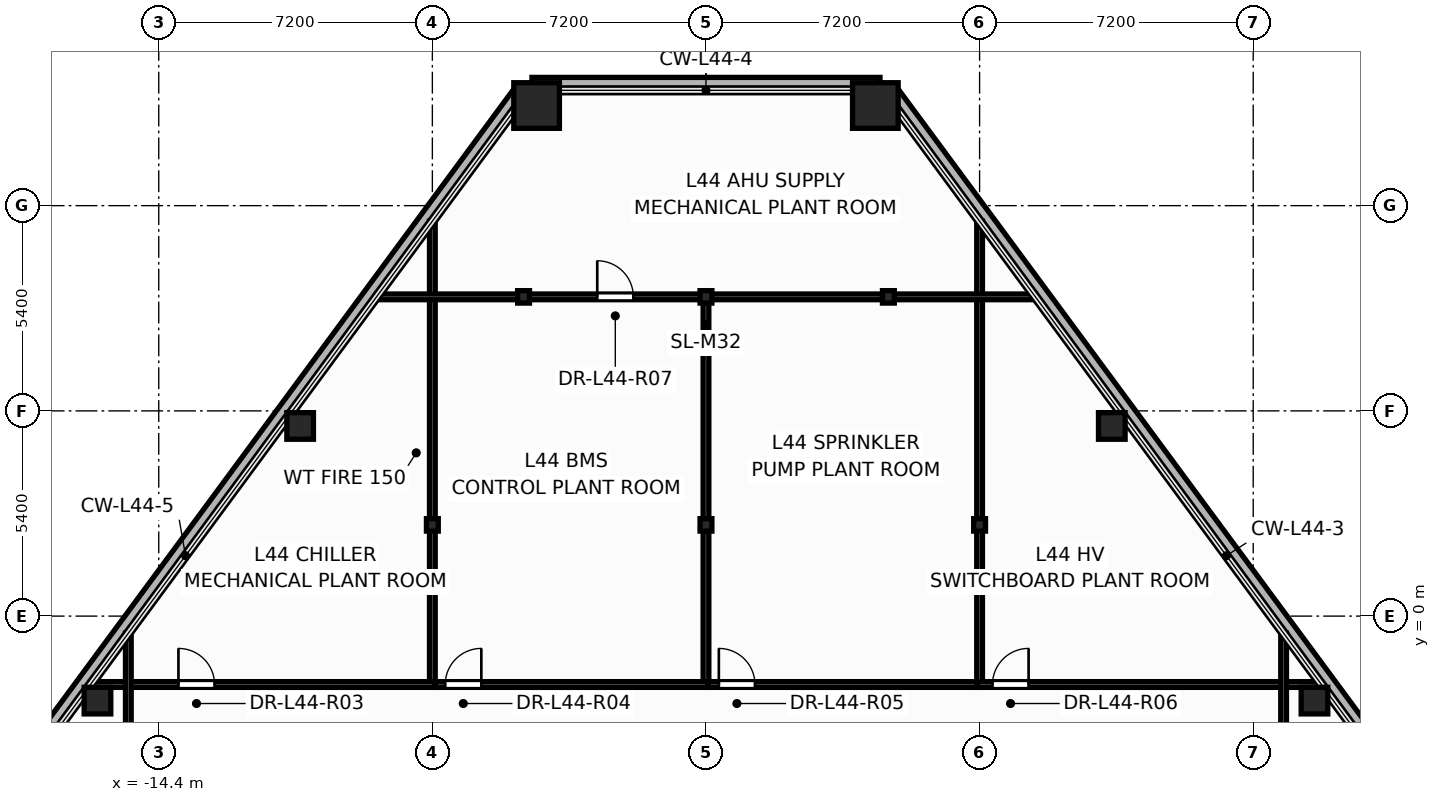
"""IFC4 building model, lengths in metres.
Left out: names, types, materials, properties, quantities, classifications, styles, units other than length and angle.
Written with IfcOpenShell. Run it as: python <this file> out.ifc"""

import sys

from ifc_helpers import new_model, si_unit, direction, frame, frame_2d, origin, origin_2d, place, context, subcontext, project, spatial, rectangle, hollow_rectangle, hollow_circle, i_section, extrude, element, fill, save


model = new_model("IFC4")
c1 = context("Model", 3, precision=1e-05, world=origin(), true_north=direction((0.0, 1.0)))
c2 = subcontext(c1, "Body", "Model", "MODEL_VIEW")
j1 = project(units=[si_unit("LENGTHUNIT", "METRE"), si_unit("PLANEANGLEUNIT", "RADIAN")], contexts=[c1])
p1 = place(None, origin())
s1 = spatial("IfcSite", under=j1, at=p1, CompositionType="ELEMENT")
p2 = place(p1, origin())
s2 = spatial("IfcBuilding", under=s1, at=p2, CompositionType="ELEMENT")
p3 = place(p2, frame((0.0, 0.0, 168.9)))
s3 = spatial("IfcBuildingStorey", under=s2, at=p3, CompositionType="ELEMENT", Elevation=168.9)
for number, where, z_axis, x_axis in (
    (1, (4.457, 13.435, 0.0), (0.0, 0.0, 1.0), (1.0, 0.0, 0.0)),
    (2, (-4.457, 13.435, 0.0), (0.0, 0.0, 1.0), (1.0, 0.0, 0.0)),
):
    element("IfcColumn", number, at=place(p3, frame(where, z_axis=z_axis, x_axis=x_axis)), inside=s3, PredefinedType="COLUMN", context=c2, shape_type="SweptSolid", body=[
        extrude(hollow_rectangle(XDim=1.2, YDim=1.2, WallThickness=0.055, at=origin_2d()), origin(), (0.0, 0.0, 1.0), 4.8),
    ])
for number, where, z_axis, x_axis in (
    (3, (16.012, -2.223, 0.0), (0.0, 0.0, 1.0), (1.0, 0.0, 0.0)),
    (4, (10.679, 5.003, 0.0), (0.0, 0.0, 1.0), (1.0, 0.0, 0.0)),
    (5, (-10.679, 5.003, 0.0), (0.0, 0.0, 1.0), (1.0, 0.0, 0.0)),
    (6, (-16.012, -2.223, 0.0), (0.0, 0.0, 1.0), (1.0, 0.0, 0.0)),
):
    element("IfcColumn", number, at=place(p3, frame(where, z_axis=z_axis, x_axis=x_axis)), inside=s3, PredefinedType="COLUMN", context=c2, shape_type="SweptSolid", body=[
        extrude(hollow_circle(Radius=0.35, WallThickness=0.03, at=origin_2d()), origin(), (0.0, 0.0, 1.0), 4.8),
    ])
for number, where, z_axis, x_axis in (
    (7, (-7.2, 2.4, 0.0), (0.0, 0.0, 1.0), (1.0, 0.0, 0.0)),
    (8, (0.0, 2.4, 0.0), (0.0, 0.0, 1.0), (1.0, 0.0, 0.0)),
    (9, (7.2, 2.4, 0.0), (0.0, 0.0, 1.0), (1.0, 0.0, 0.0)),
    (10, (-4.8, 8.4, 0.0), (0.0, 0.0, 1.0), (1.0, 0.0, 0.0)),
    (11, (0.0, 8.4, 0.0), (0.0, 0.0, 1.0), (1.0, 0.0, 0.0)),
    (12, (4.8, 8.4, 0.0), (0.0, 0.0, 1.0), (1.0, 0.0, 0.0)),
):
    element("IfcColumn", number, at=place(p3, frame(where, z_axis=z_axis, x_axis=x_axis)), inside=s3, PredefinedType="COLUMN", context=c2, shape_type="SweptSolid", body=[
        extrude(i_section(OverallWidth=0.311, OverallDepth=0.327, WebThickness=0.016, FlangeThickness=0.025, at=origin_2d()), origin(), (0.0, 0.0, 1.0), 4.8),
    ])
p4 = place(p3, frame((22.812, -10.495, -0.2), z_axis=(0.0, 0.0, 1.0), x_axis=(-0.593788907914, 0.804620862791, 0.0)))
e13 = element("IfcWall", 13, at=p4, inside=s3, PredefinedType="PARAPET", context=c2, shape_type="SweptSolid", body=[
    extrude(rectangle(XDim=30.276, YDim=0.36, at=frame_2d((15.138, 0.0))), origin(), (0.0, 0.0, 1.0), 0.38),
])
p5 = place(p3, frame((4.579, 13.995, -0.2), z_axis=(0.0, 0.0, 1.0), x_axis=(-1.0, 0.0, 0.0)))
e14 = element("IfcWall", 14, at=p5, inside=s3, PredefinedType="PARAPET", context=c2, shape_type="SweptSolid", body=[
    extrude(rectangle(XDim=9.158, YDim=0.36, at=frame_2d((4.579, 0.0))), origin(), (0.0, 0.0, 1.0), 0.38),
])
p6 = place(p3, frame((-4.835, 13.865, -0.2), z_axis=(0.0, 0.0, 1.0), x_axis=(-0.593788907914, -0.804620862791, 0.0)))
e15 = element("IfcWall", 15, at=p6, inside=s3, PredefinedType="PARAPET", context=c2, shape_type="SweptSolid", body=[
    extrude(rectangle(XDim=30.276, YDim=0.36, at=frame_2d((15.138, 0.0))), origin(), (0.0, 0.0, 1.0), 0.38),
])
for number, where, z_axis, x_axis in (
    (16, (-7.2, -1.8, 0.0), (0.0, 0.0, 1.0), (0.0, 1.0, 0.0)),
    (17, (7.2, -1.8, 0.0), (0.0, 0.0, 1.0), (0.0, 1.0, 0.0)),
):
    element("IfcWall", number, at=place(p3, frame(where, z_axis=z_axis, x_axis=x_axis)), inside=s3, PredefinedType="PARTITIONING", context=c2, shape_type="SweptSolid", body=[
        extrude(rectangle(XDim=12.191, YDim=0.15, at=frame_2d((6.096, 0.0))), origin(), (0.0, 0.0, 1.0), 2.485),
    ])
p7 = place(p3, frame((0.0, -1.8, 0.0), z_axis=(0.0, 0.0, 1.0), x_axis=(0.0, 1.0, 0.0)))
e18 = element("IfcWall", 18, at=p7, inside=s3, PredefinedType="PARTITIONING", context=c2, shape_type="SweptSolid", body=[
    extrude(rectangle(XDim=10.2, YDim=0.15, at=frame_2d((5.1, 0.0))), origin(), (0.0, 0.0, 1.0), 3.495),
])
p8 = place(p3, frame((-16.197, -1.8, 0.0), z_axis=(0.0, 0.0, 1.0), x_axis=(1.0, 0.0, 0.0)))
e19 = element("IfcWall", 19, at=p8, inside=s3, PredefinedType="PARTITIONING", context=c2, shape_type="SweptSolid", body=[
    extrude(rectangle(XDim=9.057, YDim=0.15, at=frame_2d((4.529, 0.0))), origin(), (0.0, 0.0, 1.0), 2.485),
])
p9 = place(p8, frame((2.315, 0.0, 0.0)))
e20 = element("IfcOpeningElement", 20, at=p9, cuts=e19, PredefinedType="OPENING", context=c2, shape_type="SweptSolid", body=[
    extrude(rectangle(XDim=0.956, YDim=2.104, at=frame_2d((0.475, 1.052))), frame((0.0, 0.085, 0.0), z_axis=(0.0, -1.0, 0.0), x_axis=(1.0, 0.0, 0.0)), (0.0, 0.0, 1.0), 0.17),
])
p10 = place(p3, frame((7.14, -1.8, 0.0), z_axis=(0.0, 0.0, 1.0), x_axis=(1.0, 0.0, 0.0)))
e21 = element("IfcWall", 21, at=p10, inside=s3, PredefinedType="PARTITIONING", context=c2, shape_type="SweptSolid", body=[
    extrude(rectangle(XDim=9.057, YDim=0.15, at=frame_2d((4.529, 0.0))), origin(), (0.0, 0.0, 1.0), 2.485),
])
p11 = place(p10, frame((0.4, 0.0, 0.0)))
e22 = element("IfcOpeningElement", 22, at=p11, cuts=e21, PredefinedType="OPENING", context=c2, shape_type="SweptSolid", body=[
    extrude(rectangle(XDim=0.956, YDim=2.104, at=frame_2d((0.475, 1.052))), frame((0.0, 0.085, 0.0), z_axis=(0.0, -1.0, 0.0), x_axis=(1.0, 0.0, 0.0)), (0.0, 0.0, 1.0), 0.17),
])
p12 = place(p3, frame((-8.67, 8.4, 0.0), z_axis=(0.0, 0.0, 1.0), x_axis=(1.0, 0.0, 0.0)))
e23 = element("IfcWall", 23, at=p12, inside=s3, PredefinedType="PARTITIONING", context=c2, shape_type="SweptSolid", body=[
    extrude(rectangle(XDim=8.67, YDim=0.15, at=frame_2d((4.335, 0.0))), origin(), (0.0, 0.0, 1.0), 2.585),
])
p13 = place(p12, frame((5.809, 0.0, 0.0)))
e24 = element("IfcOpeningElement", 24, at=p13, cuts=e23, PredefinedType="OPENING", context=c2, shape_type="SweptSolid", body=[
    extrude(rectangle(XDim=0.956, YDim=2.104, at=frame_2d((0.475, 1.052))), frame((0.0, 0.085, 0.0), z_axis=(0.0, -1.0, 0.0), x_axis=(1.0, 0.0, 0.0)), (0.0, 0.0, 1.0), 0.17),
])
p14 = place(p3, frame((0.0, 8.4, 0.0), z_axis=(0.0, 0.0, 1.0), x_axis=(1.0, 0.0, 0.0)))
e25 = element("IfcWall", 25, at=p14, inside=s3, PredefinedType="PARTITIONING", context=c2, shape_type="SweptSolid", body=[
    extrude(rectangle(XDim=8.67, YDim=0.15, at=frame_2d((4.335, 0.0))), origin(), (0.0, 0.0, 1.0), 2.585),
])
p15 = place(p3, frame((-7.138, -1.8, 0.0), z_axis=(0.0, 0.0, 1.0), x_axis=(1.0, 0.0, 0.0)))
e26 = element("IfcWall", 26, at=p15, inside=s3, PredefinedType="PARTITIONING", context=c2, shape_type="SweptSolid", body=[
    extrude(rectangle(XDim=7.198, YDim=0.15, at=frame_2d((3.599, 0.0))), origin(), (0.0, 0.0, 1.0), 2.485),
])
p16 = place(p15, frame((0.277, 0.0, 0.0)))
e27 = element("IfcOpeningElement", 27, at=p16, cuts=e26, PredefinedType="OPENING", context=c2, shape_type="SweptSolid", body=[
    extrude(rectangle(XDim=0.956, YDim=2.104, at=frame_2d((0.475, 1.052))), frame((0.0, 0.085, 0.0), z_axis=(0.0, -1.0, 0.0), x_axis=(1.0, 0.0, 0.0)), (0.0, 0.0, 1.0), 0.17),
])
p17 = place(p3, frame((0.062, -1.8, 0.0), z_axis=(0.0, 0.0, 1.0), x_axis=(1.0, 0.0, 0.0)))
e28 = element("IfcWall", 28, at=p17, inside=s3, PredefinedType="PARTITIONING", context=c2, shape_type="SweptSolid", body=[
    extrude(rectangle(XDim=7.076, YDim=0.15, at=frame_2d((3.538, 0.0))), origin(), (0.0, 0.0, 1.0), 2.485),
])
p18 = place(p17, frame((0.277, 0.0, 0.0)))
e29 = element("IfcOpeningElement", 29, at=p18, cuts=e28, PredefinedType="OPENING", context=c2, shape_type="SweptSolid", body=[
    extrude(rectangle(XDim=0.956, YDim=2.104, at=frame_2d((0.475, 1.052))), frame((0.0, 0.085, 0.0), z_axis=(0.0, -1.0, 0.0), x_axis=(1.0, 0.0, 0.0)), (0.0, 0.0, 1.0), 0.17),
])
for number, where, z_axis, x_axis in (
    (30, (-15.2, -4.4, 0.0), (0.0, 0.0, 1.0), (0.0, 1.0, 0.0)),
    (31, (15.2, -4.4, 0.0), (0.0, 0.0, 1.0), (0.0, 1.0, 0.0)),
):
    element("IfcWall", number, at=place(p3, frame(where, z_axis=z_axis, x_axis=x_axis)), inside=s3, PredefinedType="PARTITIONING", context=c2, shape_type="SweptSolid", body=[
        extrude(rectangle(XDim=3.951, YDim=0.15, at=frame_2d((1.975, 0.0))), origin(), (0.0, 0.0, 1.0), 2.485),
    ])
p19 = place(p9, origin())
e32 = element("IfcDoor", 32, at=p19, inside=s3, OperationType="SINGLE_SWING_LEFT", PredefinedType="DOOR", context=c2, shape_type="SweptSolid", body=[
    extrude(rectangle(XDim=0.95, YDim=2.1, at=frame_2d((0.475, 1.05))), frame((0.0, 0.025, 0.0), z_axis=(0.0, -1.0, 0.0), x_axis=(1.0, 0.0, 0.0)), (0.0, 0.0, 1.0), 0.05),
])
fill(e20, e32)
p20 = place(p16, origin())
e33 = element("IfcDoor", 33, at=p20, inside=s3, OperationType="SINGLE_SWING_RIGHT", PredefinedType="DOOR", context=c2, shape_type="SweptSolid", body=[
    extrude(rectangle(XDim=0.95, YDim=2.1, at=frame_2d((0.475, 1.05))), frame((0.0, 0.025, 0.0), z_axis=(0.0, -1.0, 0.0), x_axis=(1.0, 0.0, 0.0)), (0.0, 0.0, 1.0), 0.05),
])
fill(e27, e33)
p21 = place(p18, origin())
e34 = element("IfcDoor", 34, at=p21, inside=s3, OperationType="SINGLE_SWING_LEFT", PredefinedType="DOOR", context=c2, shape_type="SweptSolid", body=[
    extrude(rectangle(XDim=0.95, YDim=2.1, at=frame_2d((0.475, 1.05))), frame((0.0, 0.025, 0.0), z_axis=(0.0, -1.0, 0.0), x_axis=(1.0, 0.0, 0.0)), (0.0, 0.0, 1.0), 0.05),
])
fill(e29, e34)
p22 = place(p11, origin())
e35 = element("IfcDoor", 35, at=p22, inside=s3, OperationType="SINGLE_SWING_RIGHT", PredefinedType="DOOR", context=c2, shape_type="SweptSolid", body=[
    extrude(rectangle(XDim=0.95, YDim=2.1, at=frame_2d((0.475, 1.05))), frame((0.0, 0.025, 0.0), z_axis=(0.0, -1.0, 0.0), x_axis=(1.0, 0.0, 0.0)), (0.0, 0.0, 1.0), 0.05),
])
fill(e22, e35)
p23 = place(p13, origin())
e36 = element("IfcDoor", 36, at=p23, inside=s3, OperationType="SINGLE_SWING_LEFT", PredefinedType="DOOR", context=c2, shape_type="SweptSolid", body=[
    extrude(rectangle(XDim=0.95, YDim=2.1, at=frame_2d((0.475, 1.05))), frame((0.0, 0.025, 0.0), z_axis=(0.0, -1.0, 0.0), x_axis=(1.0, 0.0, 0.0)), (0.0, 0.0, 1.0), 0.05),
])
fill(e24, e36)
save(model, sys.argv[1])
